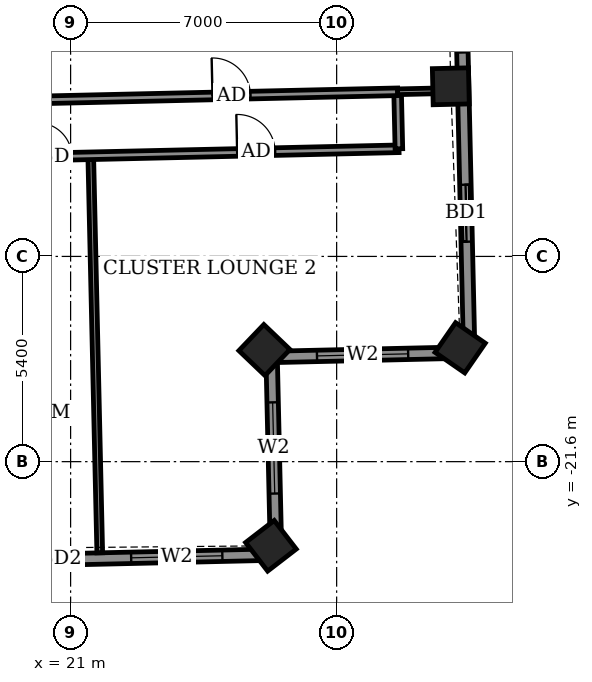
"""IFC4 building model, lengths in metres.
Left out: names, types, materials, properties, quantities, classifications, styles, units other than length and angle.
Written with IfcOpenShell. Run it as: python <this file> out.ifc"""

import sys

from ifc_helpers import new_model, si_unit, direction, frame, frame_2d, origin, origin_2d, place, context, subcontext, project, spatial, rectangle, extrude, element, fill, save


model = new_model("IFC4")
c1 = context("Model", 3, precision=1e-05, world=origin(), true_north=direction((0.0, 1.0)))
c2 = subcontext(c1, "Body", "Model", "MODEL_VIEW")
j1 = project(units=[si_unit("LENGTHUNIT", "METRE"), si_unit("PLANEANGLEUNIT", "RADIAN")], contexts=[c1])
p1 = place(None, origin())
s1 = spatial("IfcSite", under=j1, at=p1, CompositionType="ELEMENT")
p2 = place(p1, origin())
s2 = spatial("IfcBuilding", under=s1, at=p2, CompositionType="ELEMENT")
p3 = place(p2, frame((0.0, 0.0, 279.9)))
s3 = spatial("IfcBuildingStorey", under=s2, at=p3, CompositionType="ELEMENT", Elevation=279.9)
for number, where, z_axis, x_axis in (
    (1, (26.271, -23.814, -0.55), (0.0, 0.0, 1.0), (0.792, 0.61, 0.0)),
    (2, (26.1, -18.664, -0.55), (0.0, 0.0, 1.0), (0.691, 0.723, 0.0)),
    (3, (31.25, -18.604, -0.55), (0.0, 0.0, 1.0), (0.569, 0.822, 0.0)),
    (4, (31.004, -11.724, -0.55), (0.0, 0.0, 1.0), (-0.023, 1.0, 0.0)),
):
    element("IfcColumn", number, at=place(p3, frame(where, z_axis=z_axis, x_axis=x_axis)), inside=s3, PredefinedType="COLUMN", context=c2, shape_type="SweptSolid", body=[
        extrude(rectangle(XDim=0.95, YDim=0.95, at=origin_2d()), origin(), (0.0, 0.0, 1.0), 3.6),
    ])
p4 = place(p3, frame((31.488, -18.727, 0.0), z_axis=(0.0, 0.0, 1.0), x_axis=(-0.022666132143, 0.999743090226, 0.0)))
e5 = element("IfcWall", 5, at=p4, inside=s3, PredefinedType="SOLIDWALL", context=c2, shape_type="SweptSolid", body=[
    extrude(rectangle(XDim=14.649, YDim=0.3, at=frame_2d((7.324, 0.0))), origin(), (0.0, 0.0, 1.0), 2.5),
])
p5 = place(p4, frame((2.915, 0.0, 0.0)))
e6 = element("IfcOpeningElement", 6, at=p5, cuts=e5, PredefinedType="OPENING", context=c2, shape_type="SweptSolid", body=[
    extrude(rectangle(XDim=1.5, YDim=2.4, at=frame_2d((0.75, 1.2))), frame((0.0, 0.16, 0.0), z_axis=(0.0, -1.0, 0.0), x_axis=(1.0, 0.0, 0.0)), (0.0, 0.0, 1.0), 0.32),
])
p6 = place(p4, frame((7.895, 0.0, 0.9)))
e7 = element("IfcOpeningElement", 7, at=p6, cuts=e5, PredefinedType="OPENING", context=c2, shape_type="SweptSolid", body=[
    extrude(rectangle(XDim=2.4, YDim=1.5, at=frame_2d((1.2, 0.75))), frame((0.0, 0.16, 0.0), z_axis=(0.0, -1.0, 0.0), x_axis=(1.0, 0.0, 0.0)), (0.0, 0.0, 1.0), 0.32),
])
p7 = place(p3, frame((-22.816, -25.161, 0.0), z_axis=(0.0, 0.0, 1.0), x_axis=(0.999742646411, 0.022685699159, 0.0)))
e8 = element("IfcWall", 8, at=p7, inside=s3, PredefinedType="SOLIDWALL", context=c2, shape_type="SweptSolid", body=[
    extrude(rectangle(XDim=49.236, YDim=0.3, at=frame_2d((24.618, 0.0))), origin(), (0.0, 0.0, 1.0), 2.5),
])
p8 = place(p7, frame((2.277, 0.0, 0.0)))
e9 = element("IfcOpeningElement", 9, at=p8, cuts=e8, PredefinedType="OPENING", context=c2, shape_type="SweptSolid", body=[
    extrude(rectangle(XDim=1.5, YDim=2.4, at=frame_2d((0.75, 1.2))), frame((0.0, 0.16, 0.0), z_axis=(0.0, -1.0, 0.0), x_axis=(1.0, 0.0, 0.0)), (0.0, 0.0, 1.0), 0.32),
])
p9 = place(p7, frame((7.726, 0.0, 0.0)))
e10 = element("IfcOpeningElement", 10, at=p9, cuts=e8, PredefinedType="OPENING", context=c2, shape_type="SweptSolid", body=[
    extrude(rectangle(XDim=1.5, YDim=2.4, at=frame_2d((0.75, 1.2))), frame((0.0, 0.16, 0.0), z_axis=(0.0, -1.0, 0.0), x_axis=(1.0, 0.0, 0.0)), (0.0, 0.0, 1.0), 0.32),
])
p10 = place(p7, frame((11.039, 0.0, 0.0)))
e11 = element("IfcOpeningElement", 11, at=p10, cuts=e8, PredefinedType="OPENING", context=c2, shape_type="SweptSolid", body=[
    extrude(rectangle(XDim=1.5, YDim=2.4, at=frame_2d((0.75, 1.2))), frame((0.0, 0.16, 0.0), z_axis=(0.0, -1.0, 0.0), x_axis=(1.0, 0.0, 0.0)), (0.0, 0.0, 1.0), 0.32),
])
p11 = place(p7, frame((15.589, 0.0, 0.0)))
e12 = element("IfcOpeningElement", 12, at=p11, cuts=e8, PredefinedType="OPENING", context=c2, shape_type="SweptSolid", body=[
    extrude(rectangle(XDim=1.5, YDim=2.4, at=frame_2d((0.75, 1.2))), frame((0.0, 0.16, 0.0), z_axis=(0.0, -1.0, 0.0), x_axis=(1.0, 0.0, 0.0)), (0.0, 0.0, 1.0), 0.32),
])
p12 = place(p7, frame((18.903, 0.0, 0.0)))
e13 = element("IfcOpeningElement", 13, at=p12, cuts=e8, PredefinedType="OPENING", context=c2, shape_type="SweptSolid", body=[
    extrude(rectangle(XDim=1.5, YDim=2.4, at=frame_2d((0.75, 1.2))), frame((0.0, 0.16, 0.0), z_axis=(0.0, -1.0, 0.0), x_axis=(1.0, 0.0, 0.0)), (0.0, 0.0, 1.0), 0.32),
])
p13 = place(p7, frame((24.3, 0.0, 0.0)))
e14 = element("IfcOpeningElement", 14, at=p13, cuts=e8, PredefinedType="OPENING", context=c2, shape_type="SweptSolid", body=[
    extrude(rectangle(XDim=1.5, YDim=2.4, at=frame_2d((0.75, 1.2))), frame((0.0, 0.16, 0.0), z_axis=(0.0, -1.0, 0.0), x_axis=(1.0, 0.0, 0.0)), (0.0, 0.0, 1.0), 0.32),
])
p14 = place(p7, frame((29.265, 0.0, 0.0)))
e15 = element("IfcOpeningElement", 15, at=p14, cuts=e8, PredefinedType="OPENING", context=c2, shape_type="SweptSolid", body=[
    extrude(rectangle(XDim=1.5, YDim=2.4, at=frame_2d((0.75, 1.2))), frame((0.0, 0.16, 0.0), z_axis=(0.0, -1.0, 0.0), x_axis=(1.0, 0.0, 0.0)), (0.0, 0.0, 1.0), 0.32),
])
p15 = place(p7, frame((32.579, 0.0, 0.0)))
e16 = element("IfcOpeningElement", 16, at=p15, cuts=e8, PredefinedType="OPENING", context=c2, shape_type="SweptSolid", body=[
    extrude(rectangle(XDim=1.5, YDim=2.4, at=frame_2d((0.75, 1.2))), frame((0.0, 0.16, 0.0), z_axis=(0.0, -1.0, 0.0), x_axis=(1.0, 0.0, 0.0)), (0.0, 0.0, 1.0), 0.32),
])
p16 = place(p7, frame((37.4, 0.0, 0.0)))
e17 = element("IfcOpeningElement", 17, at=p16, cuts=e8, PredefinedType="OPENING", context=c2, shape_type="SweptSolid", body=[
    extrude(rectangle(XDim=1.5, YDim=2.4, at=frame_2d((0.75, 1.2))), frame((0.0, 0.16, 0.0), z_axis=(0.0, -1.0, 0.0), x_axis=(1.0, 0.0, 0.0)), (0.0, 0.0, 1.0), 0.32),
])
p17 = place(p7, frame((42.967, 0.0, 0.0)))
e18 = element("IfcOpeningElement", 18, at=p17, cuts=e8, PredefinedType="OPENING", context=c2, shape_type="SweptSolid", body=[
    extrude(rectangle(XDim=1.2, YDim=2.4, at=frame_2d((0.6, 1.2))), frame((0.0, 0.16, 0.0), z_axis=(0.0, -1.0, 0.0), x_axis=(1.0, 0.0, 0.0)), (0.0, 0.0, 1.0), 0.32),
])
p18 = place(p7, frame((45.421, 0.0, 0.9)))
e19 = element("IfcOpeningElement", 19, at=p18, cuts=e8, PredefinedType="OPENING", context=c2, shape_type="SweptSolid", body=[
    extrude(rectangle(XDim=2.4, YDim=1.5, at=frame_2d((1.2, 0.75))), frame((0.0, 0.16, 0.0), z_axis=(0.0, -1.0, 0.0), x_axis=(1.0, 0.0, 0.0)), (0.0, 0.0, 1.0), 0.32),
])
p19 = place(p3, frame((26.407, -24.044, 0.0), z_axis=(0.0, 0.0, 1.0), x_axis=(-0.022675548694, 0.99974287669, 0.0)))
e20 = element("IfcWall", 20, at=p19, inside=s3, PredefinedType="SOLIDWALL", context=c2, shape_type="SweptSolid", body=[
    extrude(rectangle(XDim=5.2, YDim=0.3, at=frame_2d((2.6, 0.0))), origin(), (0.0, 0.0, 1.0), 2.55),
])
p20 = place(p19, frame((1.605, 0.0, 0.9)))
e21 = element("IfcOpeningElement", 21, at=p20, cuts=e20, PredefinedType="OPENING", context=c2, shape_type="SweptSolid", body=[
    extrude(rectangle(XDim=2.4, YDim=1.5, at=frame_2d((1.2, 0.75))), frame((0.0, 0.16, 0.0), z_axis=(0.0, -1.0, 0.0), x_axis=(1.0, 0.0, 0.0)), (0.0, 0.0, 1.0), 0.32),
])
p21 = place(p3, frame((26.289, -18.845, 0.0), z_axis=(0.0, 0.0, 1.0), x_axis=(0.99974287669, 0.022675548694, 0.0)))
e22 = element("IfcWall", 22, at=p21, inside=s3, PredefinedType="SOLIDWALL", context=c2, shape_type="SweptSolid", body=[
    extrude(rectangle(XDim=5.2, YDim=0.3, at=frame_2d((2.6, 0.0))), origin(), (0.0, 0.0, 1.0), 2.55),
])
p22 = place(p21, frame((1.194, 0.0, 0.9)))
e23 = element("IfcOpeningElement", 23, at=p22, cuts=e22, PredefinedType="OPENING", context=c2, shape_type="SweptSolid", body=[
    extrude(rectangle(XDim=2.4, YDim=1.5, at=frame_2d((1.2, 0.75))), frame((0.0, 0.16, 0.0), z_axis=(0.0, -1.0, 0.0), x_axis=(1.0, 0.0, 0.0)), (0.0, 0.0, 1.0), 0.32),
])
p23 = place(p3, frame((21.767, -23.999, 0.0), z_axis=(0.0, 0.0, 1.0), x_axis=(-0.022716582742, 0.999741945138, 0.0)))
e24 = element("IfcWall", 24, at=p23, inside=s3, PredefinedType="PARTITIONING", context=c2, shape_type="SweptSolid", body=[
    extrude(rectangle(XDim=10.35, YDim=0.15, at=frame_2d((5.175, 0.0))), origin(), (0.0, 0.0, 1.0), 2.55),
])
p24 = place(p3, frame((-25.731, -14.624, 0.0), z_axis=(0.0, 0.0, 1.0), x_axis=(0.999742799525, 0.022678950563, 0.0)))
e25 = element("IfcWall", 25, at=p24, inside=s3, PredefinedType="PARTITIONING", context=c2, shape_type="SweptSolid", body=[
    extrude(rectangle(XDim=55.386, YDim=0.2, at=frame_2d((27.693, 0.0))), origin(), (0.0, 0.0, 1.0), 3.05),
])
p25 = place(p24, frame((3.149, 0.0, 0.0)))
e26 = element("IfcOpeningElement", 26, at=p25, cuts=e25, PredefinedType="OPENING", context=c2, shape_type="SweptSolid", body=[
    extrude(rectangle(XDim=1.0, YDim=2.1, at=frame_2d((0.5, 1.05))), frame((0.0, 0.11, 0.0), z_axis=(0.0, -1.0, 0.0), x_axis=(1.0, 0.0, 0.0)), (0.0, 0.0, 1.0), 0.22),
])
p26 = place(p24, frame((11.1, 0.0, 0.0)))
e27 = element("IfcOpeningElement", 27, at=p26, cuts=e25, PredefinedType="OPENING", context=c2, shape_type="SweptSolid", body=[
    extrude(rectangle(XDim=0.9, YDim=2.1, at=frame_2d((0.45, 1.05))), frame((0.0, 0.11, 0.0), z_axis=(0.0, -1.0, 0.0), x_axis=(1.0, 0.0, 0.0)), (0.0, 0.0, 1.0), 0.22),
])
p27 = place(p24, frame((12.95, 0.0, 0.0)))
e28 = element("IfcOpeningElement", 28, at=p27, cuts=e25, PredefinedType="OPENING", context=c2, shape_type="SweptSolid", body=[
    extrude(rectangle(XDim=0.9, YDim=2.1, at=frame_2d((0.45, 1.05))), frame((0.0, 0.11, 0.0), z_axis=(0.0, -1.0, 0.0), x_axis=(1.0, 0.0, 0.0)), (0.0, 0.0, 1.0), 0.22),
])
p28 = place(p24, frame((19.675, 0.0, 0.0)))
e29 = element("IfcOpeningElement", 29, at=p28, cuts=e25, PredefinedType="OPENING", context=c2, shape_type="SweptSolid", body=[
    extrude(rectangle(XDim=0.9, YDim=2.1, at=frame_2d((0.45, 1.05))), frame((0.0, 0.11, 0.0), z_axis=(0.0, -1.0, 0.0), x_axis=(1.0, 0.0, 0.0)), (0.0, 0.0, 1.0), 0.22),
])
p29 = place(p24, frame((21.7, 0.0, 0.0)))
e30 = element("IfcOpeningElement", 30, at=p29, cuts=e25, PredefinedType="OPENING", context=c2, shape_type="SweptSolid", body=[
    extrude(rectangle(XDim=0.9, YDim=2.1, at=frame_2d((0.45, 1.05))), frame((0.0, 0.11, 0.0), z_axis=(0.0, -1.0, 0.0), x_axis=(1.0, 0.0, 0.0)), (0.0, 0.0, 1.0), 0.22),
])
p30 = place(p24, frame((28.475, 0.0, 0.0)))
e31 = element("IfcOpeningElement", 31, at=p30, cuts=e25, PredefinedType="OPENING", context=c2, shape_type="SweptSolid", body=[
    extrude(rectangle(XDim=0.9, YDim=2.1, at=frame_2d((0.45, 1.05))), frame((0.0, 0.11, 0.0), z_axis=(0.0, -1.0, 0.0), x_axis=(1.0, 0.0, 0.0)), (0.0, 0.0, 1.0), 0.22),
])
p31 = place(p24, frame((30.45, 0.0, 0.0)))
e32 = element("IfcOpeningElement", 32, at=p31, cuts=e25, PredefinedType="OPENING", context=c2, shape_type="SweptSolid", body=[
    extrude(rectangle(XDim=0.9, YDim=2.1, at=frame_2d((0.45, 1.05))), frame((0.0, 0.11, 0.0), z_axis=(0.0, -1.0, 0.0), x_axis=(1.0, 0.0, 0.0)), (0.0, 0.0, 1.0), 0.22),
])
p32 = place(p24, frame((37.25, 0.0, 0.0)))
e33 = element("IfcOpeningElement", 33, at=p32, cuts=e25, PredefinedType="OPENING", context=c2, shape_type="SweptSolid", body=[
    extrude(rectangle(XDim=0.9, YDim=2.1, at=frame_2d((0.45, 1.05))), frame((0.0, 0.11, 0.0), z_axis=(0.0, -1.0, 0.0), x_axis=(1.0, 0.0, 0.0)), (0.0, 0.0, 1.0), 0.22),
])
p33 = place(p24, frame((39.175, 0.0, 0.0)))
e34 = element("IfcOpeningElement", 34, at=p33, cuts=e25, PredefinedType="OPENING", context=c2, shape_type="SweptSolid", body=[
    extrude(rectangle(XDim=0.9, YDim=2.1, at=frame_2d((0.45, 1.05))), frame((0.0, 0.11, 0.0), z_axis=(0.0, -1.0, 0.0), x_axis=(1.0, 0.0, 0.0)), (0.0, 0.0, 1.0), 0.22),
])
p34 = place(p24, frame((45.875, 0.0, 0.0)))
e35 = element("IfcOpeningElement", 35, at=p34, cuts=e25, PredefinedType="OPENING", context=c2, shape_type="SweptSolid", body=[
    extrude(rectangle(XDim=0.9, YDim=2.1, at=frame_2d((0.45, 1.05))), frame((0.0, 0.11, 0.0), z_axis=(0.0, -1.0, 0.0), x_axis=(1.0, 0.0, 0.0)), (0.0, 0.0, 1.0), 0.22),
])
p35 = place(p24, frame((51.127, 0.0, 0.0)))
e36 = element("IfcOpeningElement", 36, at=p35, cuts=e25, PredefinedType="OPENING", context=c2, shape_type="SweptSolid", body=[
    extrude(rectangle(XDim=1.0, YDim=2.1, at=frame_2d((0.5, 1.05))), frame((0.0, 0.11, 0.0), z_axis=(0.0, -1.0, 0.0), x_axis=(1.0, 0.0, 0.0)), (0.0, 0.0, 1.0), 0.22),
])
p36 = place(p3, frame((29.638, -13.368, 0.0), z_axis=(0.0, 0.0, 1.0), x_axis=(-0.022617910375, 0.999744182344, 0.0)))
e37 = element("IfcWall", 37, at=p36, inside=s3, PredefinedType="PARTITIONING", context=c2, shape_type="SweptSolid", body=[
    extrude(rectangle(XDim=1.5, YDim=0.2, at=frame_2d((0.75, 0.0))), origin(), (0.0, 0.0, 1.0), 3.05),
])
p37 = place(p3, frame((18.985, -12.109, 0.0), z_axis=(0.0, 0.0, 1.0), x_axis=(0.999742771882, 0.022680169073, 0.0)))
e38 = element("IfcWall", 38, at=p37, inside=s3, PredefinedType="PARTITIONING", context=c2, shape_type="SweptSolid", body=[
    extrude(rectangle(XDim=10.625, YDim=0.2, at=frame_2d((5.312, 0.0))), origin(), (0.0, 0.0, 1.0), 3.05),
])
p38 = place(p37, frame((5.75, 0.0, 0.0)))
e39 = element("IfcOpeningElement", 39, at=p38, cuts=e38, PredefinedType="OPENING", context=c2, shape_type="SweptSolid", body=[
    extrude(rectangle(XDim=1.0, YDim=2.1, at=frame_2d((0.5, 1.05))), frame((0.0, 0.11, 0.0), z_axis=(0.0, -1.0, 0.0), x_axis=(1.0, 0.0, 0.0)), (0.0, 0.0, 1.0), 0.22),
])
p39 = place(p3, frame((29.603, -11.868, 0.0), z_axis=(0.0, 0.0, 1.0), x_axis=(0.999741755729, 0.022724916977, 0.0)))
e40 = element("IfcWall", 40, at=p39, inside=s3, PredefinedType="PARTITIONING", context=c2, shape_type="SweptSolid", body=[
    extrude(rectangle(XDim=1.579, YDim=0.15, at=frame_2d((0.79, 0.0))), origin(), (0.0, 0.0, 1.0), 3.05),
])
p40 = place(p5, origin())
e41 = element("IfcDoor", 41, at=p40, inside=s3, OperationType="SLIDING_TO_LEFT", PredefinedType="DOOR", context=c2, shape_type="SweptSolid", body=[
    extrude(rectangle(XDim=1.5, YDim=2.4, at=frame_2d((0.75, 1.2))), frame((0.0, 0.025, 0.0), z_axis=(0.0, -1.0, 0.0), x_axis=(1.0, 0.0, 0.0)), (0.0, 0.0, 1.0), 0.05),
])
fill(e6, e41)
p41 = place(p6, origin())
e42 = element("IfcWindow", 42, at=p41, inside=s3, PartitioningType="DOUBLE_PANEL_VERTICAL", PredefinedType="WINDOW", context=c2, shape_type="SweptSolid", body=[
    extrude(rectangle(XDim=2.4, YDim=1.5, at=frame_2d((1.2, 0.75))), frame((0.0, 0.03, 0.0), z_axis=(0.0, -1.0, 0.0), x_axis=(1.0, 0.0, 0.0)), (0.0, 0.0, 1.0), 0.06),
])
fill(e7, e42)
p42 = place(p17, origin())
e43 = element("IfcDoor", 43, at=p42, inside=s3, OperationType="SLIDING_TO_LEFT", PredefinedType="DOOR", context=c2, shape_type="SweptSolid", body=[
    extrude(rectangle(XDim=1.2, YDim=2.4, at=frame_2d((0.6, 1.2))), frame((0.0, 0.025, 0.0), z_axis=(0.0, -1.0, 0.0), x_axis=(1.0, 0.0, 0.0)), (0.0, 0.0, 1.0), 0.05),
])
fill(e18, e43)
p43 = place(p18, origin())
e44 = element("IfcWindow", 44, at=p43, inside=s3, PartitioningType="DOUBLE_PANEL_VERTICAL", PredefinedType="WINDOW", context=c2, shape_type="SweptSolid", body=[
    extrude(rectangle(XDim=2.4, YDim=1.5, at=frame_2d((1.2, 0.75))), frame((0.0, 0.03, 0.0), z_axis=(0.0, -1.0, 0.0), x_axis=(1.0, 0.0, 0.0)), (0.0, 0.0, 1.0), 0.06),
])
fill(e19, e44)
p44 = place(p20, origin())
e45 = element("IfcWindow", 45, at=p44, inside=s3, PartitioningType="DOUBLE_PANEL_VERTICAL", PredefinedType="WINDOW", context=c2, shape_type="SweptSolid", body=[
    extrude(rectangle(XDim=2.4, YDim=1.5, at=frame_2d((1.2, 0.75))), frame((0.0, 0.03, 0.0), z_axis=(0.0, -1.0, 0.0), x_axis=(1.0, 0.0, 0.0)), (0.0, 0.0, 1.0), 0.06),
])
fill(e21, e45)
p45 = place(p22, origin())
e46 = element("IfcWindow", 46, at=p45, inside=s3, PartitioningType="DOUBLE_PANEL_VERTICAL", PredefinedType="WINDOW", context=c2, shape_type="SweptSolid", body=[
    extrude(rectangle(XDim=2.4, YDim=1.5, at=frame_2d((1.2, 0.75))), frame((0.0, 0.03, 0.0), z_axis=(0.0, -1.0, 0.0), x_axis=(1.0, 0.0, 0.0)), (0.0, 0.0, 1.0), 0.06),
])
fill(e23, e46)
p46 = place(p34, origin())
e47 = element("IfcDoor", 47, at=p46, inside=s3, OperationType="SINGLE_SWING_LEFT", PredefinedType="DOOR", context=c2, shape_type="SweptSolid", body=[
    extrude(rectangle(XDim=0.9, YDim=2.1, at=frame_2d((0.45, 1.05))), frame((0.0, 0.025, 0.0), z_axis=(0.0, -1.0, 0.0), x_axis=(1.0, 0.0, 0.0)), (0.0, 0.0, 1.0), 0.05),
])
fill(e35, e47)
p47 = place(p35, origin())
e48 = element("IfcDoor", 48, at=p47, inside=s3, OperationType="SINGLE_SWING_RIGHT", PredefinedType="DOOR", context=c2, shape_type="SweptSolid", body=[
    extrude(rectangle(XDim=1.0, YDim=2.1, at=frame_2d((0.5, 1.05))), frame((0.0, 0.025, 0.0), z_axis=(0.0, -1.0, 0.0), x_axis=(1.0, 0.0, 0.0)), (0.0, 0.0, 1.0), 0.05),
])
fill(e36, e48)
p48 = place(p38, origin())
e49 = element("IfcDoor", 49, at=p48, inside=s3, OperationType="SINGLE_SWING_LEFT", PredefinedType="DOOR", context=c2, shape_type="SweptSolid", body=[
    extrude(rectangle(XDim=1.0, YDim=2.1, at=frame_2d((0.5, 1.05))), frame((0.0, 0.025, 0.0), z_axis=(0.0, -1.0, 0.0), x_axis=(1.0, 0.0, 0.0)), (0.0, 0.0, 1.0), 0.05),
])
fill(e39, e49)
save(model, sys.argv[1])
